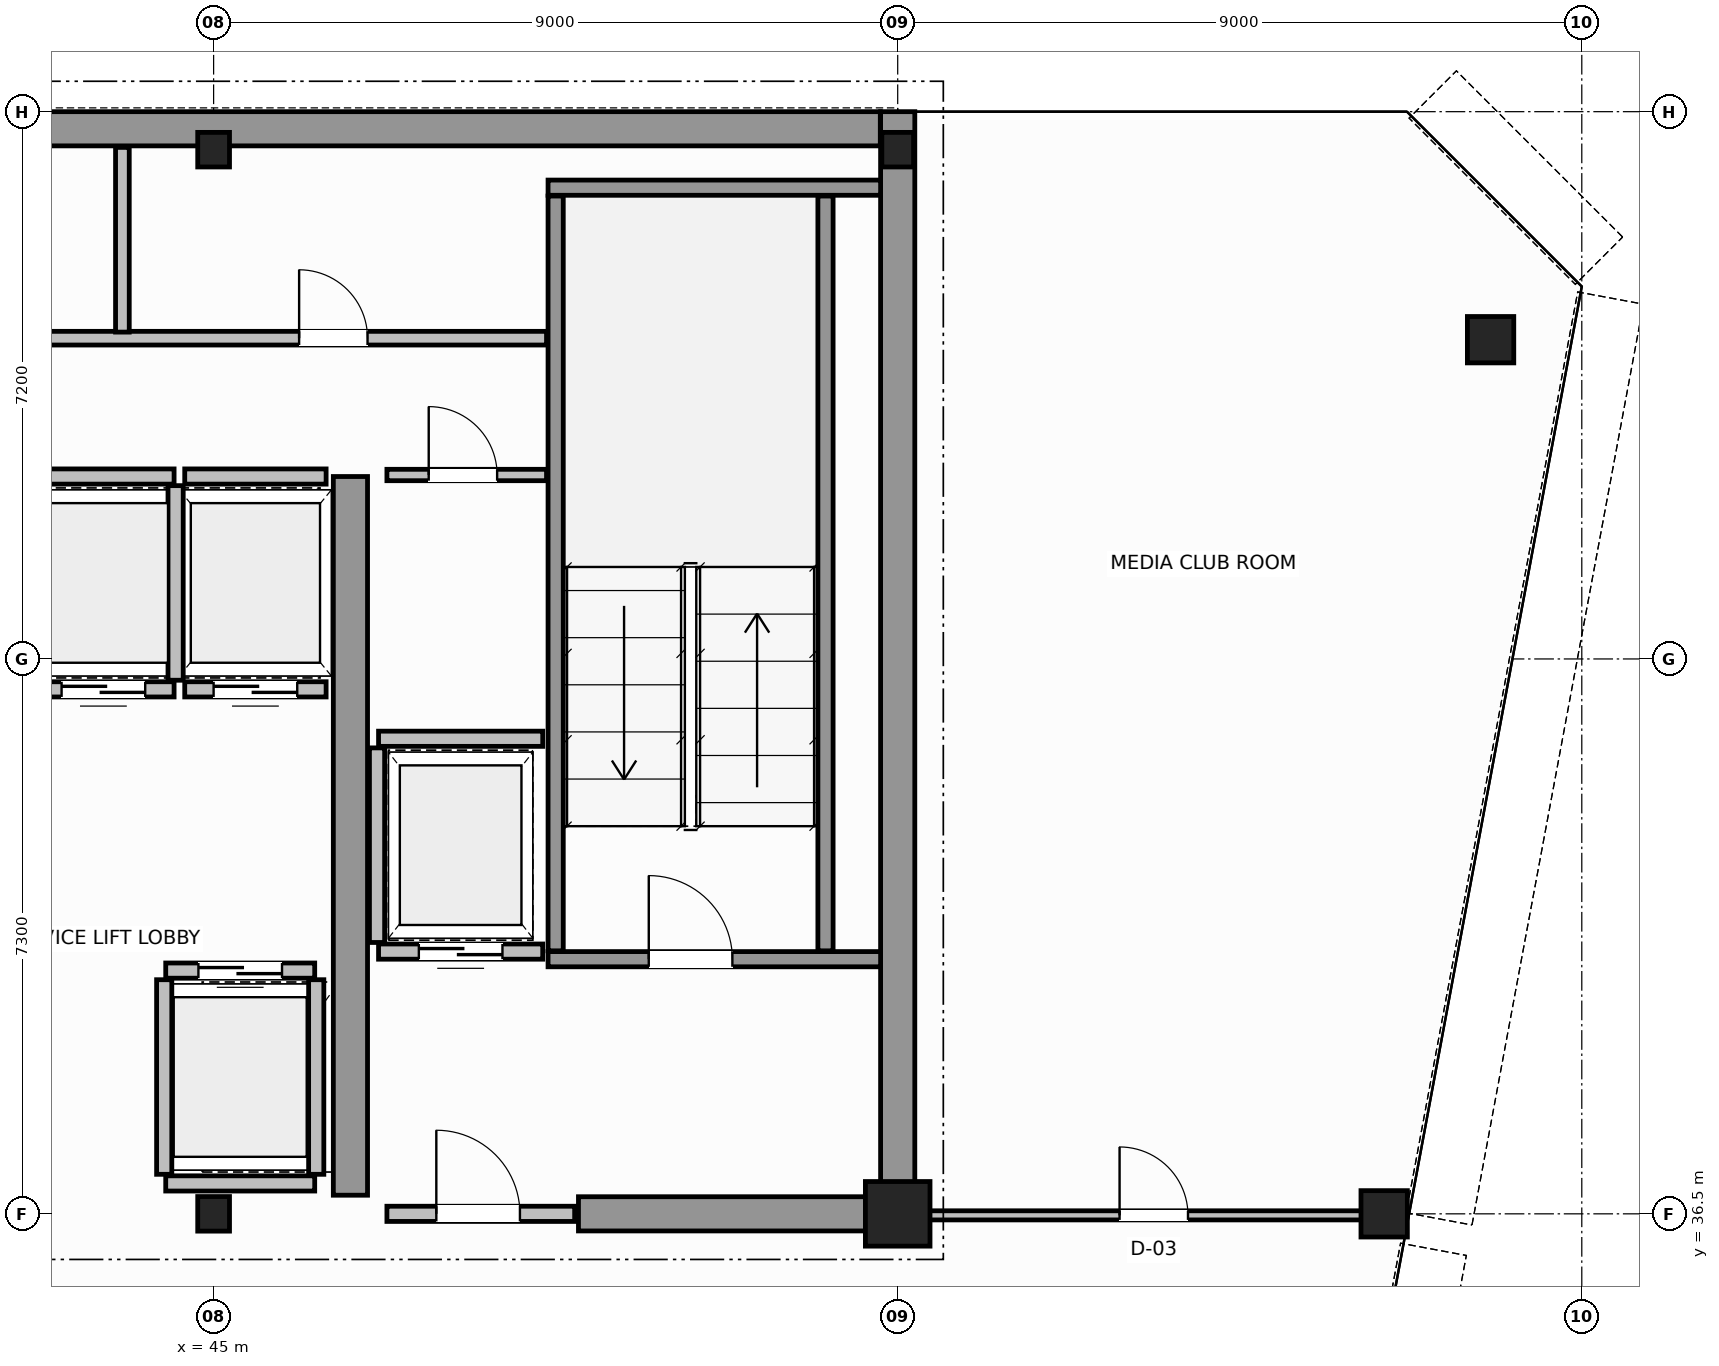
"""IFC4 building model, lengths in metres.
Left out: names, types, materials, properties, quantities, classifications, styles, units other than length and angle.
Written with IfcOpenShell. Run it as: python <this file> out.ifc"""

import sys

from ifc_helpers import new_model, si_unit, direction, frame, frame_2d, origin, origin_2d, place, context, subcontext, project, spatial, rectangle, hollow_circle, i_section, extrude, source, transform, mapped, element, fill, save


model = new_model("IFC4")
c1 = context("Model", 3, precision=1e-05, world=origin(), true_north=direction((0.0, 1.0)))
c2 = subcontext(c1, "Body", "Model", "MODEL_VIEW")
j1 = project(units=[si_unit("LENGTHUNIT", "METRE"), si_unit("PLANEANGLEUNIT", "RADIAN")], contexts=[c1])
p1 = place(None, origin())
s1 = spatial("IfcSite", under=j1, at=p1, CompositionType="ELEMENT")
p2 = place(p1, origin())
s2 = spatial("IfcBuilding", under=s1, at=p2, CompositionType="ELEMENT")
p3 = place(p2, frame((0.0, 0.0, 265.0)))
s3 = spatial("IfcBuildingStorey", under=s2, at=p3, CompositionType="ELEMENT", Elevation=265.0)
m1 = source(origin(), c2, "Body", "SweptSolid", [
    extrude(i_section(OverallWidth=0.418, OverallDepth=0.455, WebThickness=0.042, FlangeThickness=0.058, FilletRadius=0.015, at=origin_2d()), origin(), (0.0, 0.0, 1.0), 3.8),
])
p4 = place(p3, frame((45.0, 36.5, 0.0), z_axis=(0.0, 0.0, 1.0), x_axis=(1.0, 0.0, 0.0)))
e1 = element("IfcColumn", 1, at=p4, inside=s3, PredefinedType="COLUMN", context=c2, shape_type="MappedRepresentation", body=[
    mapped(m1, transform((0.0, 0.0, 0.0), scale=1.0)),
])
m2 = source(origin(), c2, "Body", "SweptSolid", [
    extrude(rectangle(XDim=0.85, YDim=0.85, at=origin_2d()), origin(), (0.0, 0.0, 1.0), 3.8),
])
p5 = place(p3, frame((54.0, 36.5, 0.0), z_axis=(0.0, 0.0, 1.0), x_axis=(1.0, 0.0, 0.0)))
e2 = element("IfcColumn", 2, at=p5, inside=s3, PredefinedType="COLUMN", context=c2, shape_type="MappedRepresentation", body=[
    mapped(m2, transform((0.0, 0.0, 0.0), scale=1.0)),
])
for number, where, z_axis, x_axis in (
    (3, (45.0, 50.5, 0.0), (0.0, 0.0, 1.0), (1.0, 0.0, 0.0)),
    (4, (54.0, 50.5, 0.0), (0.0, 0.0, 1.0), (1.0, 0.0, 0.0)),
):
    element("IfcColumn", number, at=place(p3, frame(where, z_axis=z_axis, x_axis=x_axis)), inside=s3, PredefinedType="COLUMN", context=c2, shape_type="MappedRepresentation", body=[
        mapped(m1, transform((0.0, 0.0, 0.0), scale=1.0)),
    ])
m3 = source(origin(), c2, "Body", "SweptSolid", [
    extrude(hollow_circle(Radius=0.305, WallThickness=0.03, at=origin_2d()), origin(), (0.0, 0.0, 1.0), 3.8),
])
for number, where, z_axis, x_axis in (
    (5, (61.8, 48.0, 0.0), (0.0, 0.0, 1.0), (1.0, 0.0, 0.0)),
    (6, (60.4, 36.5, 0.0), (0.0, 0.0, 1.0), (1.0, 0.0, 0.0)),
):
    element("IfcColumn", number, at=place(p3, frame(where, z_axis=z_axis, x_axis=x_axis)), inside=s3, PredefinedType="COLUMN", context=c2, shape_type="MappedRepresentation", body=[
        mapped(m3, transform((0.0, 0.0, 0.0), scale=1.0)),
    ])
p6 = place(p3, frame((34.002, 50.775, 0.0), z_axis=(0.0, 0.0, 1.0), x_axis=(1.0, 0.0, 0.0)))
e7 = element("IfcWall", 7, at=p6, inside=s3, PredefinedType="SHEAR", context=c2, shape_type="SweptSolid", body=[
    extrude(rectangle(XDim=19.769, YDim=0.45, at=frame_2d((9.885, 0.0))), origin(), (0.0, 0.0, 1.0), 3.8),
])
p7 = place(p3, frame((54.0, 36.5, 0.0), z_axis=(0.0, 0.0, 1.0), x_axis=(0.0, 1.0, 0.0)))
e8 = element("IfcWall", 8, at=p7, inside=s3, PredefinedType="SHEAR", context=c2, shape_type="SweptSolid", body=[
    extrude(rectangle(XDim=14.5, YDim=0.45, at=frame_2d((7.25, 0.0))), origin(), (0.0, 0.0, 1.0), 3.8),
])
p8 = place(p3, frame((49.8, 36.5, 0.0), z_axis=(0.0, 0.0, 1.0), x_axis=(1.0, 0.0, 0.0)))
e9 = element("IfcWall", 9, at=p8, inside=s3, PredefinedType="SHEAR", context=c2, shape_type="SweptSolid", body=[
    extrude(rectangle(XDim=3.955, YDim=0.45, at=frame_2d((1.978, 0.0))), origin(), (0.0, 0.0, 1.0), 2.58),
])
p9 = place(p3, frame((46.8, 36.745, 0.0), z_axis=(0.0, 0.0, 1.0), x_axis=(0.0, 1.0, 0.0)))
e10 = element("IfcWall", 10, at=p9, inside=s3, PredefinedType="SHEAR", context=c2, shape_type="SweptSolid", body=[
    extrude(rectangle(XDim=9.455, YDim=0.45, at=frame_2d((4.728, 0.0))), origin(), (0.0, 0.0, 1.0), 3.8),
])
p10 = place(p3, frame((49.4, 39.85, 0.0), z_axis=(0.0, 0.0, 1.0), x_axis=(1.0, 0.0, 0.0)))
e11 = element("IfcWall", 11, at=p10, inside=s3, PredefinedType="SOLIDWALL", context=c2, shape_type="SweptSolid", body=[
    extrude(rectangle(XDim=4.375, YDim=0.2, at=frame_2d((2.188, 0.0))), origin(), (0.0, 0.0, 1.0), 3.8),
])
p11 = place(p10, frame((1.325, 0.0, 0.0)))
e12 = element("IfcOpeningElement", 12, at=p11, cuts=e11, PredefinedType="OPENING", context=c2, shape_type="SweptSolid", body=[
    extrude(rectangle(XDim=1.1, YDim=2.15, at=frame_2d((0.55, 1.075))), frame((0.0, 0.11, 0.0), z_axis=(0.0, -1.0, 0.0), x_axis=(1.0, 0.0, 0.0)), (0.0, 0.0, 1.0), 0.22),
])
p12 = place(p3, frame((49.4, 50.0, 0.0), z_axis=(0.0, 0.0, 1.0), x_axis=(1.0, 0.0, 0.0)))
e13 = element("IfcWall", 13, at=p12, inside=s3, PredefinedType="SOLIDWALL", context=c2, shape_type="SweptSolid", body=[
    extrude(rectangle(XDim=4.375, YDim=0.2, at=frame_2d((2.188, 0.0))), origin(), (0.0, 0.0, 1.0), 3.8),
])
for number, where, z_axis, x_axis in (
    (14, (49.5, 39.96, 0.0), (0.0, 0.0, 1.0), (0.0, 1.0, 0.0)),
    (15, (53.05, 39.96, 0.0), (0.0, 0.0, 1.0), (0.0, 1.0, 0.0)),
):
    element("IfcWall", number, at=place(p3, frame(where, z_axis=z_axis, x_axis=x_axis)), inside=s3, PredefinedType="SOLIDWALL", context=c2, shape_type="SweptSolid", body=[
        extrude(rectangle(XDim=9.93, YDim=0.2, at=frame_2d((4.965, 0.0))), origin(), (0.0, 0.0, 1.0), 3.8),
    ])
p13 = place(p3, frame((47.28, 36.5, 0.0), z_axis=(0.0, 0.0, 1.0), x_axis=(1.0, 0.0, 0.0)))
e16 = element("IfcWall", 16, at=p13, inside=s3, PredefinedType="SOLIDWALL", context=c2, shape_type="SweptSolid", body=[
    extrude(rectangle(XDim=2.47, YDim=0.2, at=frame_2d((1.235, 0.0))), origin(), (0.0, 0.0, 1.0), 2.57),
])
p14 = place(p13, frame((0.65, 0.0, 0.0)))
e17 = element("IfcOpeningElement", 17, at=p14, cuts=e16, PredefinedType="OPENING", context=c2, shape_type="SweptSolid", body=[
    extrude(rectangle(XDim=1.1, YDim=2.15, at=frame_2d((0.55, 1.075))), frame((0.0, 0.11, 0.0), z_axis=(0.0, -1.0, 0.0), x_axis=(1.0, 0.0, 0.0)), (0.0, 0.0, 1.0), 0.22),
])
p15 = place(p3, frame((44.37, 39.7, 0.0), z_axis=(0.0, 0.0, 1.0), x_axis=(1.0, 0.0, 0.0)))
e18 = element("IfcWall", 18, at=p15, inside=s3, PredefinedType="SOLIDWALL", context=c2, shape_type="SweptSolid", body=[
    extrude(rectangle(XDim=1.96, YDim=0.2, at=frame_2d((0.98, 0.0))), origin(), (0.0, 0.0, 1.0), 3.58),
])
p16 = place(p15, frame((0.43, 0.0, 0.0)))
e19 = element("IfcOpeningElement", 19, at=p16, cuts=e18, PredefinedType="OPENING", context=c2, shape_type="SweptSolid", body=[
    extrude(rectangle(XDim=1.1, YDim=2.15, at=frame_2d((0.55, 1.075))), frame((0.0, 0.11, 0.0), z_axis=(0.0, -1.0, 0.0), x_axis=(1.0, 0.0, 0.0)), (0.0, 0.0, 1.0), 0.22),
])
p17 = place(p3, frame((44.37, 36.9, 0.0), z_axis=(0.0, 0.0, 1.0), x_axis=(1.0, 0.0, 0.0)))
e20 = element("IfcWall", 20, at=p17, inside=s3, PredefinedType="SOLIDWALL", context=c2, shape_type="SweptSolid", body=[
    extrude(rectangle(XDim=1.96, YDim=0.2, at=frame_2d((0.98, 0.0))), origin(), (0.0, 0.0, 1.0), 2.37),
])
for number, where, z_axis, x_axis in (
    (21, (44.35, 37.02, 0.0), (0.0, 0.0, 1.0), (0.0, 1.0, 0.0)),
    (22, (46.35, 37.02, 0.0), (0.0, 0.0, 1.0), (0.0, 1.0, 0.0)),
):
    element("IfcWall", number, at=place(p3, frame(where, z_axis=z_axis, x_axis=x_axis)), inside=s3, PredefinedType="SOLIDWALL", context=c2, shape_type="SweptSolid", body=[
        extrude(rectangle(XDim=2.56, YDim=0.2, at=frame_2d((1.28, 0.0))), origin(), (0.0, 0.0, 1.0), 3.58),
    ])
p18 = place(p3, frame((42.62, 43.4, 0.0), z_axis=(0.0, 0.0, 1.0), x_axis=(1.0, 0.0, 0.0)))
e23 = element("IfcWall", 23, at=p18, inside=s3, PredefinedType="SOLIDWALL", context=c2, shape_type="SweptSolid", body=[
    extrude(rectangle(XDim=1.86, YDim=0.2, at=frame_2d((0.93, 0.0))), origin(), (0.0, 0.0, 1.0), 3.58),
])
p19 = place(p18, frame((0.38, 0.0, 0.0)))
e24 = element("IfcOpeningElement", 24, at=p19, cuts=e23, PredefinedType="OPENING", context=c2, shape_type="SweptSolid", body=[
    extrude(rectangle(XDim=1.1, YDim=2.15, at=frame_2d((0.55, 1.075))), frame((0.0, 0.11, 0.0), z_axis=(0.0, -1.0, 0.0), x_axis=(1.0, 0.0, 0.0)), (0.0, 0.0, 1.0), 0.22),
])
p20 = place(p3, frame((42.62, 46.2, 0.0), z_axis=(0.0, 0.0, 1.0), x_axis=(1.0, 0.0, 0.0)))
e25 = element("IfcWall", 25, at=p20, inside=s3, PredefinedType="SOLIDWALL", context=c2, shape_type="SweptSolid", body=[
    extrude(rectangle(XDim=1.86, YDim=0.2, at=frame_2d((0.93, 0.0))), origin(), (0.0, 0.0, 1.0), 3.58),
])
p21 = place(p3, frame((44.5, 43.52, 0.0), z_axis=(0.0, 0.0, 1.0), x_axis=(0.0, 1.0, 0.0)))
e26 = element("IfcWall", 26, at=p21, inside=s3, PredefinedType="SOLIDWALL", context=c2, shape_type="SweptSolid", body=[
    extrude(rectangle(XDim=2.56, YDim=0.2, at=frame_2d((1.28, 0.0))), origin(), (0.0, 0.0, 1.0), 2.37),
])
p22 = place(p3, frame((44.62, 43.4, 0.0), z_axis=(0.0, 0.0, 1.0), x_axis=(1.0, 0.0, 0.0)))
e27 = element("IfcWall", 27, at=p22, inside=s3, PredefinedType="SOLIDWALL", context=c2, shape_type="SweptSolid", body=[
    extrude(rectangle(XDim=1.86, YDim=0.2, at=frame_2d((0.93, 0.0))), origin(), (0.0, 0.0, 1.0), 3.58),
])
p23 = place(p22, frame((0.38, 0.0, 0.0)))
e28 = element("IfcOpeningElement", 28, at=p23, cuts=e27, PredefinedType="OPENING", context=c2, shape_type="SweptSolid", body=[
    extrude(rectangle(XDim=1.1, YDim=2.15, at=frame_2d((0.55, 1.075))), frame((0.0, 0.11, 0.0), z_axis=(0.0, -1.0, 0.0), x_axis=(1.0, 0.0, 0.0)), (0.0, 0.0, 1.0), 0.22),
])
p24 = place(p3, frame((44.62, 46.2, 0.0), z_axis=(0.0, 0.0, 1.0), x_axis=(1.0, 0.0, 0.0)))
e29 = element("IfcWall", 29, at=p24, inside=s3, PredefinedType="SOLIDWALL", context=c2, shape_type="SweptSolid", body=[
    extrude(rectangle(XDim=1.86, YDim=0.2, at=frame_2d((0.93, 0.0))), origin(), (0.0, 0.0, 1.0), 3.58),
])
p25 = place(p3, frame((47.17, 39.95, 0.0), z_axis=(0.0, 0.0, 1.0), x_axis=(1.0, 0.0, 0.0)))
e30 = element("IfcWall", 30, at=p25, inside=s3, PredefinedType="SOLIDWALL", context=c2, shape_type="SweptSolid", body=[
    extrude(rectangle(XDim=2.16, YDim=0.2, at=frame_2d((1.08, 0.0))), origin(), (0.0, 0.0, 1.0), 3.58),
])
p26 = place(p25, frame((0.53, 0.0, 0.0)))
e31 = element("IfcOpeningElement", 31, at=p26, cuts=e30, PredefinedType="OPENING", context=c2, shape_type="SweptSolid", body=[
    extrude(rectangle(XDim=1.1, YDim=2.15, at=frame_2d((0.55, 1.075))), frame((0.0, 0.11, 0.0), z_axis=(0.0, -1.0, 0.0), x_axis=(1.0, 0.0, 0.0)), (0.0, 0.0, 1.0), 0.22),
])
p27 = place(p3, frame((47.17, 42.75, 0.0), z_axis=(0.0, 0.0, 1.0), x_axis=(1.0, 0.0, 0.0)))
e32 = element("IfcWall", 32, at=p27, inside=s3, PredefinedType="SOLIDWALL", context=c2, shape_type="SweptSolid", body=[
    extrude(rectangle(XDim=2.16, YDim=0.2, at=frame_2d((1.08, 0.0))), origin(), (0.0, 0.0, 1.0), 3.58),
])
p28 = place(p3, frame((47.15, 40.07, 0.0), z_axis=(0.0, 0.0, 1.0), x_axis=(0.0, 1.0, 0.0)))
e33 = element("IfcWall", 33, at=p28, inside=s3, PredefinedType="SOLIDWALL", context=c2, shape_type="SweptSolid", body=[
    extrude(rectangle(XDim=2.56, YDim=0.2, at=frame_2d((1.28, 0.0))), origin(), (0.0, 0.0, 1.0), 3.58),
])
p29 = place(p3, frame((47.28, 46.22, 0.0), z_axis=(0.0, 0.0, 1.0), x_axis=(1.0, 0.0, 0.0)))
e34 = element("IfcWall", 34, at=p29, inside=s3, PredefinedType="PARTITIONING", context=c2, shape_type="SweptSolid", body=[
    extrude(rectangle(XDim=2.1, YDim=0.15, at=frame_2d((1.05, 0.0))), origin(), (0.0, 0.0, 1.0), 3.58),
])
p30 = place(p29, frame((0.55, 0.0, 0.0)))
e35 = element("IfcOpeningElement", 35, at=p30, cuts=e34, PredefinedType="OPENING", context=c2, shape_type="SweptSolid", body=[
    extrude(rectangle(XDim=0.9, YDim=2.1, at=frame_2d((0.45, 1.05))), frame((0.0, 0.085, 0.0), z_axis=(0.0, -1.0, 0.0), x_axis=(1.0, 0.0, 0.0)), (0.0, 0.0, 1.0), 0.17),
])
p31 = place(p3, frame((18.62, 48.02, 0.0), z_axis=(0.0, 0.0, 1.0), x_axis=(1.0, 0.0, 0.0)))
e36 = element("IfcWall", 36, at=p31, inside=s3, PredefinedType="PLUMBINGWALL", context=c2, shape_type="SweptSolid", body=[
    extrude(rectangle(XDim=30.76, YDim=0.18, at=frame_2d((15.38, 0.0))), origin(), (0.0, 0.0, 1.0), 3.58),
])
p32 = place(p31, frame((1.655, 0.0, 0.0)))
e37 = element("IfcOpeningElement", 37, at=p32, cuts=e36, PredefinedType="OPENING", context=c2, shape_type="SweptSolid", body=[
    extrude(rectangle(XDim=0.9, YDim=2.15, at=frame_2d((0.45, 1.075))), frame((0.0, 0.1, 0.0), z_axis=(0.0, -1.0, 0.0), x_axis=(1.0, 0.0, 0.0)), (0.0, 0.0, 1.0), 0.2),
])
p33 = place(p31, frame((6.03, 0.0, 0.0)))
e38 = element("IfcOpeningElement", 38, at=p33, cuts=e36, PredefinedType="OPENING", context=c2, shape_type="SweptSolid", body=[
    extrude(rectangle(XDim=0.9, YDim=2.15, at=frame_2d((0.45, 1.075))), frame((0.0, 0.1, 0.0), z_axis=(0.0, -1.0, 0.0), x_axis=(1.0, 0.0, 0.0)), (0.0, 0.0, 1.0), 0.2),
])
p34 = place(p31, frame((10.93, 0.0, 0.0)))
e39 = element("IfcOpeningElement", 39, at=p34, cuts=e36, PredefinedType="OPENING", context=c2, shape_type="SweptSolid", body=[
    extrude(rectangle(XDim=0.9, YDim=2.15, at=frame_2d((0.45, 1.075))), frame((0.0, 0.1, 0.0), z_axis=(0.0, -1.0, 0.0), x_axis=(1.0, 0.0, 0.0)), (0.0, 0.0, 1.0), 0.2),
])
p35 = place(p31, frame((16.13, 0.0, 0.0)))
e40 = element("IfcOpeningElement", 40, at=p35, cuts=e36, PredefinedType="OPENING", context=c2, shape_type="SweptSolid", body=[
    extrude(rectangle(XDim=0.9, YDim=2.15, at=frame_2d((0.45, 1.075))), frame((0.0, 0.1, 0.0), z_axis=(0.0, -1.0, 0.0), x_axis=(1.0, 0.0, 0.0)), (0.0, 0.0, 1.0), 0.2),
])
p36 = place(p31, frame((21.73, 0.0, 0.0)))
e41 = element("IfcOpeningElement", 41, at=p36, cuts=e36, PredefinedType="OPENING", context=c2, shape_type="SweptSolid", body=[
    extrude(rectangle(XDim=0.9, YDim=2.15, at=frame_2d((0.45, 1.075))), frame((0.0, 0.1, 0.0), z_axis=(0.0, -1.0, 0.0), x_axis=(1.0, 0.0, 0.0)), (0.0, 0.0, 1.0), 0.2),
])
p37 = place(p31, frame((27.505, 0.0, 0.0)))
e42 = element("IfcOpeningElement", 42, at=p37, cuts=e36, PredefinedType="OPENING", context=c2, shape_type="SweptSolid", body=[
    extrude(rectangle(XDim=0.9, YDim=2.15, at=frame_2d((0.45, 1.075))), frame((0.0, 0.1, 0.0), z_axis=(0.0, -1.0, 0.0), x_axis=(1.0, 0.0, 0.0)), (0.0, 0.0, 1.0), 0.2),
])
p38 = place(p3, frame((43.8, 48.1, 0.0), z_axis=(0.0, 0.0, 1.0), x_axis=(0.0, 1.0, 0.0)))
e43 = element("IfcWall", 43, at=p38, inside=s3, PredefinedType="PLUMBINGWALL", context=c2, shape_type="SweptSolid", body=[
    extrude(rectangle(XDim=2.43, YDim=0.18, at=frame_2d((1.215, 0.0))), origin(), (0.0, 0.0, 1.0), 3.58),
])
p39 = place(p3, frame((54.06, 36.48, 0.0), z_axis=(0.0, 0.0, 1.0), x_axis=(1.0, 0.0, 0.0)))
e44 = element("IfcWall", 44, at=p39, inside=s3, PredefinedType="PARTITIONING", context=c2, shape_type="SweptSolid", body=[
    extrude(rectangle(XDim=6.619, YDim=0.12, at=frame_2d((3.31, 0.0))), origin(), (0.0, 0.0, 1.0), 2.37),
])
p40 = place(p39, frame((2.859, 0.0, 0.0)))
e45 = element("IfcOpeningElement", 45, at=p40, cuts=e44, PredefinedType="OPENING", context=c2, shape_type="SweptSolid", body=[
    extrude(rectangle(XDim=0.9, YDim=2.15, at=frame_2d((0.45, 1.075))), frame((0.0, 0.07, 0.0), z_axis=(0.0, -1.0, 0.0), x_axis=(1.0, 0.0, 0.0)), (0.0, 0.0, 1.0), 0.14),
])
m4 = source(origin(), c2, "Body", "SweptSolid", [
    extrude(rectangle(XDim=1.1, YDim=2.15, at=frame_2d((0.55, 1.075))), frame((0.0, 0.025, 0.0), z_axis=(0.0, -1.0, 0.0), x_axis=(1.0, 0.0, 0.0)), (0.0, 0.0, 1.0), 0.05),
])
p41 = place(p11, origin())
e46 = element("IfcDoor", 46, at=p41, inside=s3, OperationType="SINGLE_SWING_RIGHT", PredefinedType="DOOR", context=c2, shape_type="MappedRepresentation", body=[
    mapped(m4, transform((0.0, 0.0, 0.0), scale=1.0)),
])
fill(e12, e46)
p42 = place(p14, origin())
e47 = element("IfcDoor", 47, at=p42, inside=s3, OperationType="SINGLE_SWING_LEFT", PredefinedType="DOOR", context=c2, shape_type="MappedRepresentation", body=[
    mapped(m4, transform((0.0, 0.0, 0.0), scale=1.0)),
])
fill(e17, e47)
p43 = place(p16, origin())
e48 = element("IfcDoor", 48, at=p43, inside=s3, OperationType="DOUBLE_DOOR_SLIDING", PredefinedType="DOOR", context=c2, shape_type="MappedRepresentation", body=[
    mapped(m4, transform((0.0, 0.0, 0.0), scale=1.0)),
])
fill(e19, e48)
p44 = place(p19, origin())
e49 = element("IfcDoor", 49, at=p44, inside=s3, OperationType="DOUBLE_DOOR_SLIDING", PredefinedType="DOOR", context=c2, shape_type="MappedRepresentation", body=[
    mapped(m4, transform((0.0, 0.0, 0.0), scale=1.0)),
])
fill(e24, e49)
p45 = place(p23, origin())
e50 = element("IfcDoor", 50, at=p45, inside=s3, OperationType="DOUBLE_DOOR_SLIDING", PredefinedType="DOOR", context=c2, shape_type="MappedRepresentation", body=[
    mapped(m4, transform((0.0, 0.0, 0.0), scale=1.0)),
])
fill(e28, e50)
p46 = place(p26, origin())
e51 = element("IfcDoor", 51, at=p46, inside=s3, OperationType="DOUBLE_DOOR_SLIDING", PredefinedType="DOOR", context=c2, shape_type="MappedRepresentation", body=[
    mapped(m4, transform((0.0, 0.0, 0.0), scale=1.0)),
])
fill(e31, e51)
m5 = source(origin(), c2, "Body", "SweptSolid", [
    extrude(rectangle(XDim=0.9, YDim=2.1, at=frame_2d((0.45, 1.05))), frame((0.0, 0.025, 0.0), z_axis=(0.0, -1.0, 0.0), x_axis=(1.0, 0.0, 0.0)), (0.0, 0.0, 1.0), 0.05),
])
p47 = place(p30, origin())
e52 = element("IfcDoor", 52, at=p47, inside=s3, OperationType="SINGLE_SWING_RIGHT", PredefinedType="DOOR", context=c2, shape_type="MappedRepresentation", body=[
    mapped(m5, transform((0.0, 0.0, 0.0), scale=1.0)),
])
fill(e35, e52)
m6 = source(origin(), c2, "Body", "SweptSolid", [
    extrude(rectangle(XDim=0.9, YDim=2.15, at=frame_2d((0.45, 1.075))), frame((0.0, 0.025, 0.0), z_axis=(0.0, -1.0, 0.0), x_axis=(1.0, 0.0, 0.0)), (0.0, 0.0, 1.0), 0.05),
])
p48 = place(p37, origin())
e53 = element("IfcDoor", 53, at=p48, inside=s3, OperationType="SINGLE_SWING_RIGHT", PredefinedType="DOOR", context=c2, shape_type="MappedRepresentation", body=[
    mapped(m6, transform((0.0, 0.0, 0.0), scale=1.0)),
])
fill(e42, e53)
p49 = place(p40, origin())
e54 = element("IfcDoor", 54, at=p49, inside=s3, OperationType="SINGLE_SWING_RIGHT", PredefinedType="DOOR", context=c2, shape_type="MappedRepresentation", body=[
    mapped(m6, transform((0.0, 0.0, 0.0), scale=1.0)),
])
fill(e45, e54)
save(model, sys.argv[1])
